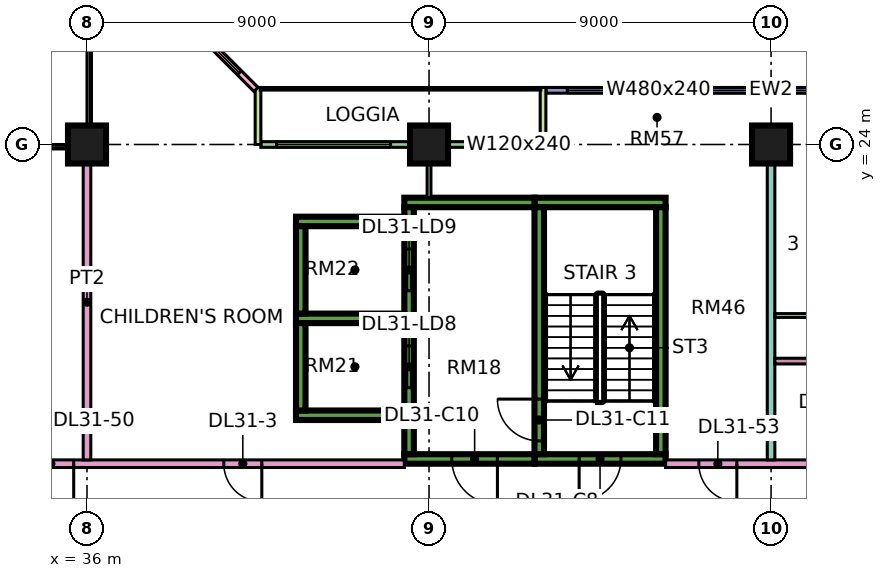
"""IFC4 building model, lengths in metres.
Left out: names, types, materials, properties, quantities, classifications, styles, units other than length and angle.
Written with IfcOpenShell. Run it as: python <this file> out.ifc"""

import sys

from ifc_helpers import new_model, si_unit, direction, frame, frame_2d, origin, origin_2d, place, context, subcontext, project, spatial, rectangle, extrude, element, fill, save


model = new_model("IFC4")
c1 = context("Model", 3, precision=1e-05, world=origin(), true_north=direction((0.0, 1.0)))
c2 = subcontext(c1, "Body", "Model", "MODEL_VIEW")
j1 = project(units=[si_unit("LENGTHUNIT", "METRE"), si_unit("PLANEANGLEUNIT", "RADIAN")], contexts=[c1])
p1 = place(None, origin())
s1 = spatial("IfcSite", under=j1, at=p1, CompositionType="ELEMENT")
p2 = place(p1, origin())
s2 = spatial("IfcBuilding", under=s1, at=p2, CompositionType="ELEMENT")
p3 = place(p2, frame((0.0, 0.0, 133.15)))
s3 = spatial("IfcBuildingStorey", under=s2, at=p3, CompositionType="ELEMENT", Elevation=133.15)
for number, where, z_axis, x_axis in (
    (1, (36.0, 24.0, 0.0), (0.0, 0.0, 1.0), (1.0, 0.0, 0.0)),
    (2, (45.0, 24.0, 0.0), (0.0, 0.0, 1.0), (1.0, 0.0, 0.0)),
    (3, (54.0, 24.0, 0.0), (0.0, 0.0, 1.0), (1.0, 0.0, 0.0)),
):
    element("IfcColumn", number, at=place(p3, frame(where, z_axis=z_axis, x_axis=x_axis)), inside=s3, PredefinedType="COLUMN", context=c2, shape_type="SweptSolid", body=[
        extrude(rectangle(XDim=1.0, YDim=1.0, at=origin_2d()), origin(), (0.0, 0.0, 1.0), 3.75),
    ])
p4 = place(p3, frame((47.775, 15.725, 0.0), z_axis=(0.0, 0.0, 1.0), x_axis=(1.0, 0.0, 0.0)))
e4 = element("IfcWall", 4, at=p4, inside=s3, PredefinedType="SHEAR", context=c2, shape_type="SweptSolid", body=[
    extrude(rectangle(XDim=3.45, YDim=0.25, at=frame_2d((1.725, 0.0))), origin(), (0.0, 0.0, 1.0), 3.75),
])
p5 = place(p4, frame((1.175, 0.0, 0.0)))
e5 = element("IfcOpeningElement", 5, at=p5, cuts=e4, PredefinedType="OPENING", context=c2, shape_type="SweptSolid", body=[
    extrude(rectangle(XDim=1.1, YDim=2.2, at=frame_2d((0.55, 1.1))), frame((0.0, 0.135, 0.0), z_axis=(0.0, -1.0, 0.0), x_axis=(1.0, 0.0, 0.0)), (0.0, 0.0, 1.0), 0.27),
])
p6 = place(p3, frame((47.775, 22.475, 0.0), z_axis=(0.0, 0.0, 1.0), x_axis=(1.0, 0.0, 0.0)))
e6 = element("IfcWall", 6, at=p6, inside=s3, PredefinedType="SHEAR", context=c2, shape_type="SweptSolid", body=[
    extrude(rectangle(XDim=3.45, YDim=0.25, at=frame_2d((1.725, 0.0))), origin(), (0.0, 0.0, 1.0), 3.75),
])
p7 = place(p3, frame((47.9, 15.85, 0.0), z_axis=(0.0, 0.0, 1.0), x_axis=(0.0, 1.0, 0.0)))
e7 = element("IfcWall", 7, at=p7, inside=s3, PredefinedType="SHEAR", context=c2, shape_type="SweptSolid", body=[
    extrude(rectangle(XDim=6.5, YDim=0.25, at=frame_2d((3.25, 0.0))), origin(), (0.0, 0.0, 1.0), 3.75),
])
p8 = place(p7, frame((0.35, 0.0, 0.0)))
e8 = element("IfcOpeningElement", 8, at=p8, cuts=e7, PredefinedType="OPENING", context=c2, shape_type="SweptSolid", body=[
    extrude(rectangle(XDim=1.1, YDim=2.2, at=frame_2d((0.55, 1.1))), frame((0.0, 0.135, 0.0), z_axis=(0.0, -1.0, 0.0), x_axis=(1.0, 0.0, 0.0)), (0.0, 0.0, 1.0), 0.27),
])
p9 = place(p3, frame((51.1, 15.85, 0.0), z_axis=(0.0, 0.0, 1.0), x_axis=(0.0, 1.0, 0.0)))
e9 = element("IfcWall", 9, at=p9, inside=s3, PredefinedType="SHEAR", context=c2, shape_type="SweptSolid", body=[
    extrude(rectangle(XDim=6.5, YDim=0.25, at=frame_2d((3.25, 0.0))), origin(), (0.0, 0.0, 1.0), 3.75),
])
p10 = place(p3, frame((44.35, 15.725, 0.0), z_axis=(0.0, 0.0, 1.0), x_axis=(1.0, 0.0, 0.0)))
e10 = element("IfcWall", 10, at=p10, inside=s3, PredefinedType="SHEAR", context=c2, shape_type="SweptSolid", body=[
    extrude(rectangle(XDim=3.425, YDim=0.25, at=frame_2d((1.712, 0.0))), origin(), (0.0, 0.0, 1.0), 3.75),
])
p11 = place(p10, frame((1.25, 0.0, 0.0)))
e11 = element("IfcOpeningElement", 11, at=p11, cuts=e10, PredefinedType="OPENING", context=c2, shape_type="SweptSolid", body=[
    extrude(rectangle(XDim=1.2, YDim=2.2, at=frame_2d((0.6, 1.1))), frame((0.0, 0.135, 0.0), z_axis=(0.0, -1.0, 0.0), x_axis=(1.0, 0.0, 0.0)), (0.0, 0.0, 1.0), 0.27),
])
p12 = place(p3, frame((44.35, 22.475, 0.0), z_axis=(0.0, 0.0, 1.0), x_axis=(1.0, 0.0, 0.0)))
e12 = element("IfcWall", 12, at=p12, inside=s3, PredefinedType="SHEAR", context=c2, shape_type="SweptSolid", body=[
    extrude(rectangle(XDim=3.425, YDim=0.25, at=frame_2d((1.712, 0.0))), origin(), (0.0, 0.0, 1.0), 3.75),
])
p13 = place(p3, frame((44.475, 15.85, 0.0), z_axis=(0.0, 0.0, 1.0), x_axis=(0.0, 1.0, 0.0)))
e13 = element("IfcWall", 13, at=p13, inside=s3, PredefinedType="SHEAR", context=c2, shape_type="SweptSolid", body=[
    extrude(rectangle(XDim=6.5, YDim=0.25, at=frame_2d((3.25, 0.0))), origin(), (0.0, 0.0, 1.0), 3.75),
])
p14 = place(p13, frame((1.75, 0.0, 0.0)))
e14 = element("IfcOpeningElement", 14, at=p14, cuts=e13, PredefinedType="OPENING", context=c2, shape_type="SweptSolid", body=[
    extrude(rectangle(XDim=1.1, YDim=2.2, at=frame_2d((0.55, 1.1))), frame((0.0, 0.135, 0.0), z_axis=(0.0, -1.0, 0.0), x_axis=(1.0, 0.0, 0.0)), (0.0, 0.0, 1.0), 0.27),
])
p15 = place(p13, frame((4.3, 0.0, 0.0)))
e15 = element("IfcOpeningElement", 15, at=p15, cuts=e13, PredefinedType="OPENING", context=c2, shape_type="SweptSolid", body=[
    extrude(rectangle(XDim=1.1, YDim=2.2, at=frame_2d((0.55, 1.1))), frame((0.0, 0.135, 0.0), z_axis=(0.0, -1.0, 0.0), x_axis=(1.0, 0.0, 0.0)), (0.0, 0.0, 1.0), 0.27),
])
for number, where, z_axis, x_axis in (
    (16, (41.5, 16.875, 0.0), (0.0, 0.0, 1.0), (1.0, 0.0, 0.0)),
    (17, (41.5, 19.425, 0.0), (0.0, 0.0, 1.0), (1.0, 0.0, 0.0)),
    (18, (41.5, 21.975, 0.0), (0.0, 0.0, 1.0), (1.0, 0.0, 0.0)),
):
    element("IfcWall", number, at=place(p3, frame(where, z_axis=z_axis, x_axis=x_axis)), inside=s3, PredefinedType="SHEAR", context=c2, shape_type="SweptSolid", body=[
        extrude(rectangle(XDim=2.85, YDim=0.25, at=frame_2d((1.425, 0.0))), origin(), (0.0, 0.0, 1.0), 3.75),
    ])
for number, where, z_axis, x_axis in (
    (19, (41.625, 17.0, 0.0), (0.0, 0.0, 1.0), (0.0, 1.0, 0.0)),
    (20, (41.625, 19.55, 0.0), (0.0, 0.0, 1.0), (0.0, 1.0, 0.0)),
):
    element("IfcWall", number, at=place(p3, frame(where, z_axis=z_axis, x_axis=x_axis)), inside=s3, PredefinedType="SHEAR", context=c2, shape_type="SweptSolid", body=[
        extrude(rectangle(XDim=2.3, YDim=0.25, at=frame_2d((1.15, 0.0))), origin(), (0.0, 0.0, 1.0), 3.75),
    ])
p16 = place(p3, frame((59.925, 25.425, 0.0), z_axis=(0.0, 0.0, 1.0), x_axis=(-1.0, 0.0, 0.0)))
e21 = element("IfcWall", 21, at=p16, inside=s3, PredefinedType="SOLIDWALL", context=c2, shape_type="SweptSolid", body=[
    extrude(rectangle(XDim=11.85, YDim=0.15, at=frame_2d((5.925, 0.0))), origin(), (0.0, 0.0, 1.0), 3.35),
])
p17 = place(p16, frame((0.562, 0.0, 0.45)))
e22 = element("IfcOpeningElement", 22, at=p17, cuts=e21, PredefinedType="OPENING", context=c2, shape_type="SweptSolid", body=[
    extrude(rectangle(XDim=1.8, YDim=2.4, at=frame_2d((0.9, 1.2))), frame((0.0, 0.085, 0.0), z_axis=(0.0, -1.0, 0.0), x_axis=(1.0, 0.0, 0.0)), (0.0, 0.0, 1.0), 0.17),
])
p18 = place(p16, frame((3.525, 0.0, 0.45)))
e23 = element("IfcOpeningElement", 23, at=p18, cuts=e21, PredefinedType="OPENING", context=c2, shape_type="SweptSolid", body=[
    extrude(rectangle(XDim=1.8, YDim=2.4, at=frame_2d((0.9, 1.2))), frame((0.0, 0.085, 0.0), z_axis=(0.0, -1.0, 0.0), x_axis=(1.0, 0.0, 0.0)), (0.0, 0.0, 1.0), 0.17),
])
p19 = place(p16, frame((6.488, 0.0, 0.45)))
e24 = element("IfcOpeningElement", 24, at=p19, cuts=e21, PredefinedType="OPENING", context=c2, shape_type="SweptSolid", body=[
    extrude(rectangle(XDim=4.8, YDim=2.4, at=frame_2d((2.4, 1.2))), frame((0.0, 0.085, 0.0), z_axis=(0.0, -1.0, 0.0), x_axis=(1.0, 0.0, 0.0)), (0.0, 0.0, 1.0), 0.17),
])
p20 = place(p3, frame((47.925, 24.0, 0.0), z_axis=(0.0, 0.0, 1.0), x_axis=(-1.0, 0.0, 0.0)))
e25 = element("IfcWall", 25, at=p20, inside=s3, PredefinedType="SOLIDWALL", context=c2, shape_type="SweptSolid", body=[
    extrude(rectangle(XDim=7.35, YDim=0.15, at=frame_2d((3.675, 0.0))), origin(), (0.0, 0.0, 1.0), 3.35),
])
p21 = place(p20, frame((0.562, 0.0, 0.45)))
e26 = element("IfcOpeningElement", 26, at=p21, cuts=e25, PredefinedType="OPENING", context=c2, shape_type="SweptSolid", body=[
    extrude(rectangle(XDim=1.2, YDim=2.4, at=frame_2d((0.6, 1.2))), frame((0.0, 0.085, 0.0), z_axis=(0.0, -1.0, 0.0), x_axis=(1.0, 0.0, 0.0)), (0.0, 0.0, 1.0), 0.17),
])
p22 = place(p20, frame((3.938, 0.0, 0.45)))
e27 = element("IfcOpeningElement", 27, at=p22, cuts=e25, PredefinedType="OPENING", context=c2, shape_type="SweptSolid", body=[
    extrude(rectangle(XDim=3.0, YDim=2.4, at=frame_2d((1.5, 1.2))), frame((0.0, 0.085, 0.0), z_axis=(0.0, -1.0, 0.0), x_axis=(1.0, 0.0, 0.0)), (0.0, 0.0, 1.0), 0.17),
])
for number, where, z_axis, x_axis in (
    (28, (48.0, 25.5, 0.0), (0.0, 0.0, 1.0), (0.0, -1.0, 0.0)),
    (29, (40.5, 25.5, 0.0), (0.0, 0.0, 1.0), (0.0, -1.0, 0.0)),
):
    element("IfcWall", number, at=place(p3, frame(where, z_axis=z_axis, x_axis=x_axis)), inside=s3, PredefinedType="SOLIDWALL", context=c2, shape_type="SweptSolid", body=[
        extrude(rectangle(XDim=1.5, YDim=0.15, at=frame_2d((0.75, 0.0))), origin(), (0.0, 0.0, 1.0), 3.35),
    ])
p23 = place(p3, frame((40.447, 25.447, 0.0), z_axis=(0.0, 0.0, 1.0), x_axis=(-0.707106781187, 0.707106781187, 0.0)))
e30 = element("IfcWall", 30, at=p23, inside=s3, PredefinedType="SOLIDWALL", context=c2, shape_type="SweptSolid", body=[
    extrude(rectangle(XDim=4.243, YDim=0.15, at=frame_2d((2.121, 0.0))), origin(), (0.0, 0.0, 1.0), 3.35),
])
p24 = place(p23, frame((0.621, 0.0, 0.45)))
e31 = element("IfcOpeningElement", 31, at=p24, cuts=e30, PredefinedType="OPENING", context=c2, shape_type="SweptSolid", body=[
    extrude(rectangle(XDim=3.0, YDim=2.4, at=frame_2d((1.5, 1.2))), frame((0.0, 0.085, 0.0), z_axis=(0.0, -1.0, 0.0), x_axis=(1.0, 0.0, 0.0)), (0.0, 0.0, 1.0), 0.17),
])
p25 = place(p3, frame((34.0, 15.6, 0.0), z_axis=(0.0, 0.0, 1.0), x_axis=(1.0, 0.0, 0.0)))
e32 = element("IfcWall", 32, at=p25, inside=s3, PredefinedType="PARTITIONING", context=c2, shape_type="SweptSolid", body=[
    extrude(rectangle(XDim=10.35, YDim=0.2, at=frame_2d((5.175, 0.0))), origin(), (0.0, 0.0, 1.0), 3.35),
])
p26 = place(p25, frame((5.6, 0.0, 0.0)))
e33 = element("IfcOpeningElement", 33, at=p26, cuts=e32, PredefinedType="OPENING", context=c2, shape_type="SweptSolid", body=[
    extrude(rectangle(XDim=1.0, YDim=2.1, at=frame_2d((0.5, 1.05))), frame((0.0, 0.11, 0.0), z_axis=(0.0, -1.0, 0.0), x_axis=(1.0, 0.0, 0.0)), (0.0, 0.0, 1.0), 0.22),
])
p27 = place(p25, frame((0.45, 0.0, 0.0)))
e34 = element("IfcOpeningElement", 34, at=p27, cuts=e32, PredefinedType="OPENING", context=c2, shape_type="SweptSolid", body=[
    extrude(rectangle(XDim=1.2, YDim=2.1, at=frame_2d((0.6, 1.05))), frame((0.0, 0.11, 0.0), z_axis=(0.0, -1.0, 0.0), x_axis=(1.0, 0.0, 0.0)), (0.0, 0.0, 1.0), 0.22),
])
p28 = place(p3, frame((36.0, 15.7, 0.0), z_axis=(0.0, 0.0, 1.0), x_axis=(0.0, 1.0, 0.0)))
e35 = element("IfcWall", 35, at=p28, inside=s3, PredefinedType="PARTITIONING", context=c2, shape_type="SweptSolid", body=[
    extrude(rectangle(XDim=8.3, YDim=0.2, at=frame_2d((4.15, 0.0))), origin(), (0.0, 0.0, 1.0), 3.35),
])
p29 = place(p3, frame((45.0, 22.6, 0.0), z_axis=(0.0, 0.0, 1.0), x_axis=(0.0, 1.0, 0.0)))
e36 = element("IfcWall", 36, at=p29, inside=s3, PredefinedType="PARTITIONING", context=c2, shape_type="SweptSolid", body=[
    extrude(rectangle(XDim=1.326, YDim=0.1, at=frame_2d((0.663, 0.0))), origin(), (0.0, 0.0, 1.0), 3.35),
])
p30 = place(p3, frame((51.225, 15.6, 0.0), z_axis=(0.0, 0.0, 1.0), x_axis=(1.0, 0.0, 0.0)))
e37 = element("IfcWall", 37, at=p30, inside=s3, PredefinedType="PARTITIONING", context=c2, shape_type="SweptSolid", body=[
    extrude(rectangle(XDim=20.701, YDim=0.2, at=frame_2d((10.351, 0.0))), origin(), (0.0, 0.0, 1.0), 3.35),
])
p31 = place(p30, frame((15.875, 0.0, 0.0)))
e38 = element("IfcOpeningElement", 38, at=p31, cuts=e37, PredefinedType="OPENING", context=c2, shape_type="SweptSolid", body=[
    extrude(rectangle(XDim=1.0, YDim=2.1, at=frame_2d((0.5, 1.05))), frame((0.0, 0.11, 0.0), z_axis=(0.0, -1.0, 0.0), x_axis=(1.0, 0.0, 0.0)), (0.0, 0.0, 1.0), 0.22),
])
p32 = place(p30, frame((0.875, 0.0, 0.0)))
e39 = element("IfcOpeningElement", 39, at=p32, cuts=e37, PredefinedType="OPENING", context=c2, shape_type="SweptSolid", body=[
    extrude(rectangle(XDim=1.0, YDim=2.1, at=frame_2d((0.5, 1.05))), frame((0.0, 0.11, 0.0), z_axis=(0.0, -1.0, 0.0), x_axis=(1.0, 0.0, 0.0)), (0.0, 0.0, 1.0), 0.22),
])
p33 = place(p3, frame((54.0, 15.7, 0.0), z_axis=(0.0, 0.0, 1.0), x_axis=(0.0, 1.0, 0.0)))
e40 = element("IfcWall", 40, at=p33, inside=s3, PredefinedType="PARTITIONING", context=c2, shape_type="SweptSolid", body=[
    extrude(rectangle(XDim=8.3, YDim=0.2, at=frame_2d((4.15, 0.0))), origin(), (0.0, 0.0, 1.0), 3.35),
])
p34 = place(p3, frame((54.1, 18.3, 0.0), z_axis=(0.0, 0.0, 1.0), x_axis=(1.0, 0.0, 0.0)))
e41 = element("IfcWall", 41, at=p34, inside=s3, PredefinedType="PARTITIONING", context=c2, shape_type="SweptSolid", body=[
    extrude(rectangle(XDim=11.975, YDim=0.15, at=frame_2d((5.987, 0.0))), origin(), (0.0, 0.0, 1.0), 3.35),
])
p35 = place(p34, frame((5.45, 0.0, 0.0)))
e42 = element("IfcOpeningElement", 42, at=p35, cuts=e41, PredefinedType="OPENING", context=c2, shape_type="SweptSolid", body=[
    extrude(rectangle(XDim=0.9, YDim=2.1, at=frame_2d((0.45, 1.05))), frame((0.0, 0.085, 0.0), z_axis=(0.0, -1.0, 0.0), x_axis=(1.0, 0.0, 0.0)), (0.0, 0.0, 1.0), 0.17),
])
p36 = place(p34, frame((1.25, 0.0, 0.0)))
e43 = element("IfcOpeningElement", 43, at=p36, cuts=e41, PredefinedType="OPENING", context=c2, shape_type="SweptSolid", body=[
    extrude(rectangle(XDim=0.9, YDim=2.1, at=frame_2d((0.45, 1.05))), frame((0.0, 0.085, 0.0), z_axis=(0.0, -1.0, 0.0), x_axis=(1.0, 0.0, 0.0)), (0.0, 0.0, 1.0), 0.17),
])
p37 = place(p3, frame((54.1, 19.5, 0.0), z_axis=(0.0, 0.0, 1.0), x_axis=(1.0, 0.0, 0.0)))
e44 = element("IfcWall", 44, at=p37, inside=s3, PredefinedType="PARTITIONING", context=c2, shape_type="SweptSolid", body=[
    extrude(rectangle(XDim=2.85, YDim=0.1, at=frame_2d((1.425, 0.0))), origin(), (0.0, 0.0, 1.0), 3.35),
])
p38 = place(p37, frame((0.95, 0.0, 0.0)))
e45 = element("IfcOpeningElement", 45, at=p38, cuts=e44, PredefinedType="OPENING", context=c2, shape_type="SweptSolid", body=[
    extrude(rectangle(XDim=0.9, YDim=2.1, at=frame_2d((0.45, 1.05))), frame((0.0, 0.06, 0.0), z_axis=(0.0, -1.0, 0.0), x_axis=(1.0, 0.0, 0.0)), (0.0, 0.0, 1.0), 0.12),
])
p39 = place(p18, origin())
e46 = element("IfcWindow", 46, at=p39, inside=s3, PartitioningType="SINGLE_PANEL", PredefinedType="WINDOW", context=c2, shape_type="SweptSolid", body=[
    extrude(rectangle(XDim=1.8, YDim=2.4, at=frame_2d((0.9, 1.2))), frame((0.0, 0.03, 0.0), z_axis=(0.0, -1.0, 0.0), x_axis=(1.0, 0.0, 0.0)), (0.0, 0.0, 1.0), 0.06),
])
fill(e23, e46)
p40 = place(p19, origin())
e47 = element("IfcWindow", 47, at=p40, inside=s3, PartitioningType="SINGLE_PANEL", PredefinedType="WINDOW", context=c2, shape_type="SweptSolid", body=[
    extrude(rectangle(XDim=4.8, YDim=2.4, at=frame_2d((2.4, 1.2))), frame((0.0, 0.03, 0.0), z_axis=(0.0, -1.0, 0.0), x_axis=(1.0, 0.0, 0.0)), (0.0, 0.0, 1.0), 0.06),
])
fill(e24, e47)
p41 = place(p21, origin())
e48 = element("IfcWindow", 48, at=p41, inside=s3, PartitioningType="SINGLE_PANEL", PredefinedType="WINDOW", context=c2, shape_type="SweptSolid", body=[
    extrude(rectangle(XDim=1.2, YDim=2.4, at=frame_2d((0.6, 1.2))), frame((0.0, 0.03, 0.0), z_axis=(0.0, -1.0, 0.0), x_axis=(1.0, 0.0, 0.0)), (0.0, 0.0, 1.0), 0.06),
])
fill(e26, e48)
p42 = place(p22, origin())
e49 = element("IfcWindow", 49, at=p42, inside=s3, PartitioningType="SINGLE_PANEL", PredefinedType="WINDOW", context=c2, shape_type="SweptSolid", body=[
    extrude(rectangle(XDim=3.0, YDim=2.4, at=frame_2d((1.5, 1.2))), frame((0.0, 0.03, 0.0), z_axis=(0.0, -1.0, 0.0), x_axis=(1.0, 0.0, 0.0)), (0.0, 0.0, 1.0), 0.06),
])
fill(e27, e49)
p43 = place(p24, origin())
e50 = element("IfcWindow", 50, at=p43, inside=s3, PartitioningType="SINGLE_PANEL", PredefinedType="WINDOW", context=c2, shape_type="SweptSolid", body=[
    extrude(rectangle(XDim=3.0, YDim=2.4, at=frame_2d((1.5, 1.2))), frame((0.0, 0.03, 0.0), z_axis=(0.0, -1.0, 0.0), x_axis=(1.0, 0.0, 0.0)), (0.0, 0.0, 1.0), 0.06),
])
fill(e31, e50)
p44 = place(p5, frame((1.1, 0.0, 0.0), z_axis=(0.0, 0.0, 1.0), x_axis=(-1.0, 0.0, 0.0)))
e51 = element("IfcDoor", 51, at=p44, inside=s3, OperationType="SINGLE_SWING_LEFT", PredefinedType="DOOR", context=c2, shape_type="SweptSolid", body=[
    extrude(rectangle(XDim=1.1, YDim=2.2, at=frame_2d((0.55, 1.1))), frame((0.0, 0.025, 0.0), z_axis=(0.0, -1.0, 0.0), x_axis=(1.0, 0.0, 0.0)), (0.0, 0.0, 1.0), 0.05),
])
fill(e5, e51)
p45 = place(p11, origin())
e52 = element("IfcDoor", 52, at=p45, inside=s3, OperationType="SINGLE_SWING_RIGHT", PredefinedType="DOOR", context=c2, shape_type="SweptSolid", body=[
    extrude(rectangle(XDim=1.2, YDim=2.2, at=frame_2d((0.6, 1.1))), frame((0.0, 0.025, 0.0), z_axis=(0.0, -1.0, 0.0), x_axis=(1.0, 0.0, 0.0)), (0.0, 0.0, 1.0), 0.05),
])
fill(e11, e52)
p46 = place(p8, frame((1.1, 0.0, 0.0), z_axis=(0.0, 0.0, 1.0), x_axis=(-1.0, 0.0, 0.0)))
e53 = element("IfcDoor", 53, at=p46, inside=s3, OperationType="SINGLE_SWING_RIGHT", PredefinedType="DOOR", context=c2, shape_type="SweptSolid", body=[
    extrude(rectangle(XDim=1.1, YDim=2.2, at=frame_2d((0.55, 1.1))), frame((0.0, 0.025, 0.0), z_axis=(0.0, -1.0, 0.0), x_axis=(1.0, 0.0, 0.0)), (0.0, 0.0, 1.0), 0.05),
])
fill(e8, e53)
p47 = place(p14, origin())
e54 = element("IfcDoor", 54, at=p47, inside=s3, OperationType="DOUBLE_DOOR_SLIDING", PredefinedType="DOOR", context=c2, shape_type="SweptSolid", body=[
    extrude(rectangle(XDim=1.1, YDim=2.2, at=frame_2d((0.55, 1.1))), frame((0.0, 0.025, 0.0), z_axis=(0.0, -1.0, 0.0), x_axis=(1.0, 0.0, 0.0)), (0.0, 0.0, 1.0), 0.05),
])
fill(e14, e54)
p48 = place(p15, origin())
e55 = element("IfcDoor", 55, at=p48, inside=s3, OperationType="DOUBLE_DOOR_SLIDING", PredefinedType="DOOR", context=c2, shape_type="SweptSolid", body=[
    extrude(rectangle(XDim=1.1, YDim=2.2, at=frame_2d((0.55, 1.1))), frame((0.0, 0.025, 0.0), z_axis=(0.0, -1.0, 0.0), x_axis=(1.0, 0.0, 0.0)), (0.0, 0.0, 1.0), 0.05),
])
fill(e15, e55)
p49 = place(p26, origin())
e56 = element("IfcDoor", 56, at=p49, inside=s3, OperationType="SINGLE_SWING_RIGHT", PredefinedType="DOOR", context=c2, shape_type="SweptSolid", body=[
    extrude(rectangle(XDim=1.0, YDim=2.1, at=frame_2d((0.5, 1.05))), frame((0.0, 0.025, 0.0), z_axis=(0.0, -1.0, 0.0), x_axis=(1.0, 0.0, 0.0)), (0.0, 0.0, 1.0), 0.05),
])
fill(e33, e56)
p50 = place(p27, origin())
e57 = element("IfcDoor", 57, at=p50, inside=s3, OperationType="SINGLE_SWING_RIGHT", PredefinedType="DOOR", context=c2, shape_type="SweptSolid", body=[
    extrude(rectangle(XDim=1.2, YDim=2.1, at=frame_2d((0.6, 1.05))), frame((0.0, 0.025, 0.0), z_axis=(0.0, -1.0, 0.0), x_axis=(1.0, 0.0, 0.0)), (0.0, 0.0, 1.0), 0.05),
])
fill(e34, e57)
p51 = place(p32, origin())
e58 = element("IfcDoor", 58, at=p51, inside=s3, OperationType="SINGLE_SWING_RIGHT", PredefinedType="DOOR", context=c2, shape_type="SweptSolid", body=[
    extrude(rectangle(XDim=1.0, YDim=2.1, at=frame_2d((0.5, 1.05))), frame((0.0, 0.025, 0.0), z_axis=(0.0, -1.0, 0.0), x_axis=(1.0, 0.0, 0.0)), (0.0, 0.0, 1.0), 0.05),
])
fill(e39, e58)
save(model, sys.argv[1])
